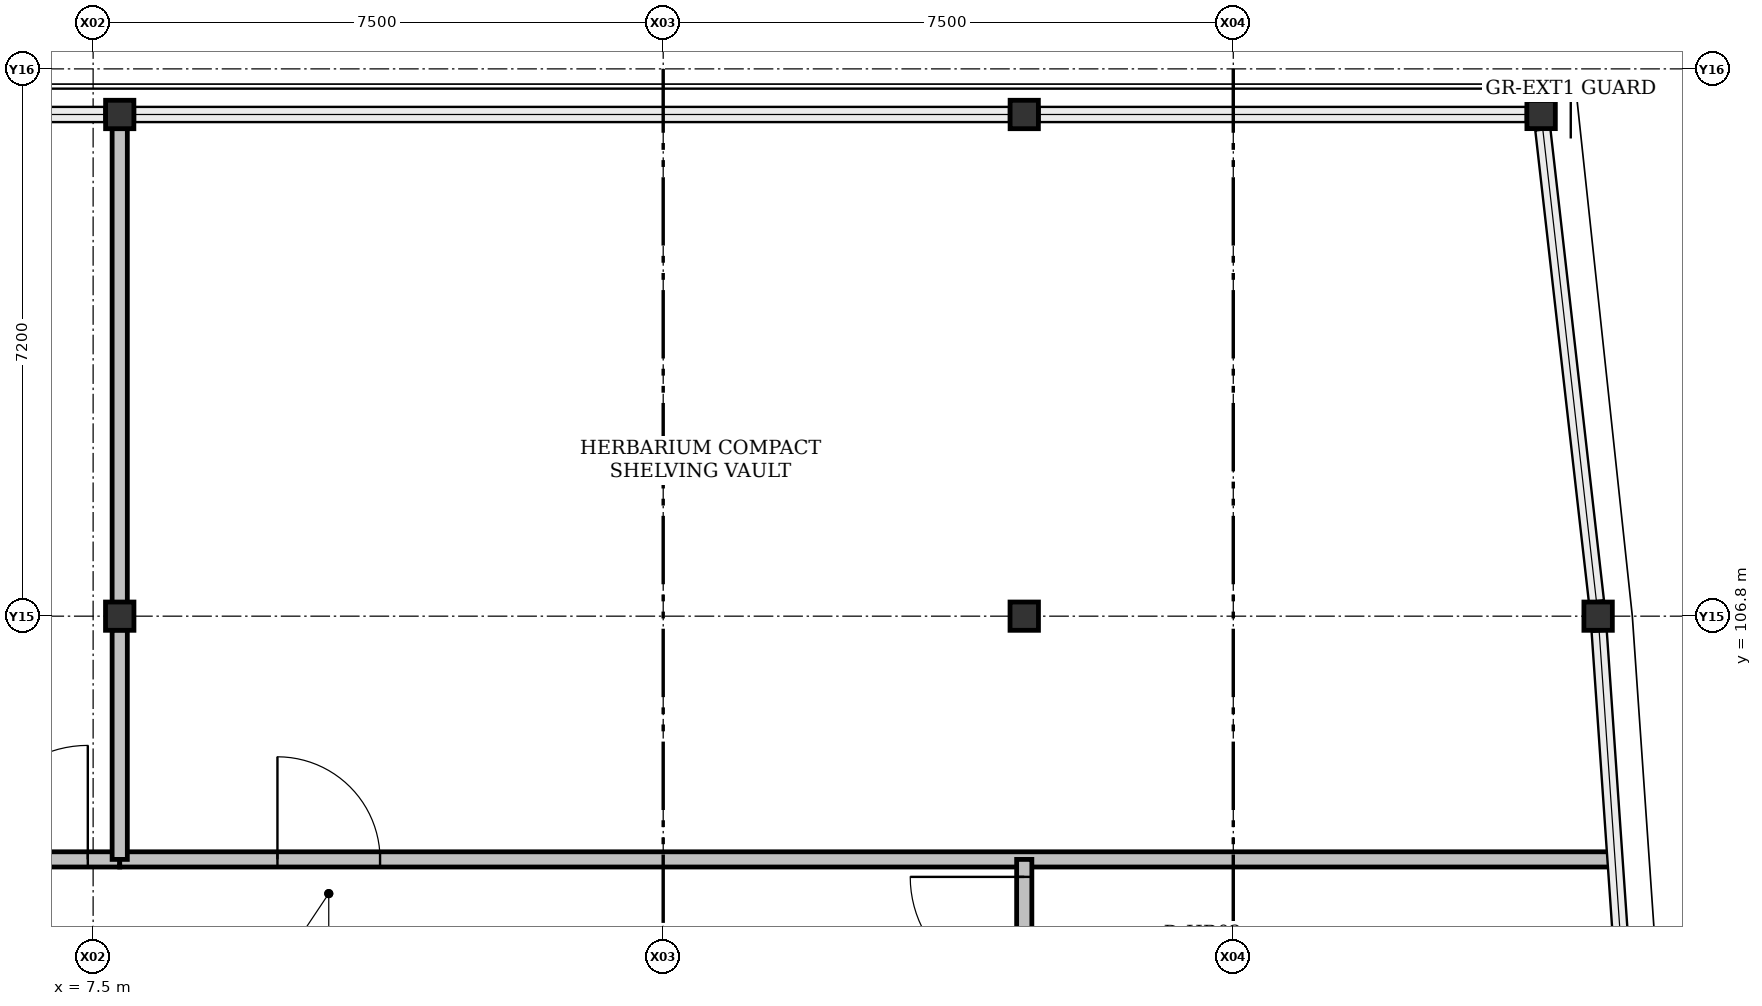
"""IFC4 building model, lengths in metres.
Left out: names, types, materials, properties, quantities, classifications, styles, units other than length and angle.
Written with IfcOpenShell. Run it as: python <this file> out.ifc"""

import sys

from ifc_helpers import new_model, si_unit, direction, frame, frame_2d, origin, origin_2d, place, context, subcontext, project, spatial, rectangle, i_section, extrude, element, fill, save


model = new_model("IFC4")
c1 = context("Model", 3, precision=1e-05, world=origin(), true_north=direction((0.0, 1.0)))
c2 = subcontext(c1, "Body", "Model", "MODEL_VIEW")
j1 = project(units=[si_unit("LENGTHUNIT", "METRE"), si_unit("PLANEANGLEUNIT", "RADIAN")], contexts=[c1])
p1 = place(None, origin())
s1 = spatial("IfcSite", under=j1, at=p1, CompositionType="ELEMENT")
p2 = place(p1, origin())
s2 = spatial("IfcBuilding", under=s1, at=p2, CompositionType="ELEMENT")
p3 = place(p2, frame((0.0, 0.0, 30.9)))
s3 = spatial("IfcBuildingStorey", under=s2, at=p3, CompositionType="ELEMENT", Elevation=30.9)
for number, where, z_axis, x_axis in (
    (1, (7.85, 106.8, 0.0), (0.0, 0.0, 1.0), (1.0, 0.0, 0.0)),
    (2, (19.75, 106.8, 0.0), (0.0, 0.0, 1.0), (1.0, 0.0, 0.0)),
    (3, (27.3, 106.8, 0.0), (0.0, 0.0, 1.0), (1.0, 0.0, 0.0)),
    (4, (7.85, 113.4, 0.0), (0.0, 0.0, 1.0), (0.0, 1.0, 0.0)),
    (5, (19.75, 113.4, 0.0), (0.0, 0.0, 1.0), (0.0, 1.0, 0.0)),
    (6, (26.55, 113.4, 0.0), (0.0, 0.0, 1.0), (1.0, 0.0, 0.0)),
):
    element("IfcColumn", number, at=place(p3, frame(where, z_axis=z_axis, x_axis=x_axis)), inside=s3, PredefinedType="COLUMN", context=c2, shape_type="SweptSolid", body=[
        extrude(i_section(OverallWidth=0.374, OverallDepth=0.372, WebThickness=0.016, FlangeThickness=0.026, FilletRadius=0.015, at=origin_2d()), origin(), (0.0, 0.0, 1.0), 4.2),
    ])
p4 = place(p3, frame((0.65, 103.6, 0.0), z_axis=(0.0, 0.0, 1.0), x_axis=(1.0, 0.0, 0.0)))
e7 = element("IfcWall", 7, at=p4, inside=s3, PredefinedType="SOLIDWALL", context=c2, shape_type="SweptSolid", body=[
    extrude(rectangle(XDim=7.2, YDim=0.2, at=frame_2d((3.6, 0.0))), origin(), (0.0, 0.0, 1.0), 3.512),
])
p5 = place(p4, frame((5.28, 0.0, 0.0)))
e8 = element("IfcOpeningElement", 8, at=p5, cuts=e7, PredefinedType="OPENING", context=c2, shape_type="SweptSolid", body=[
    extrude(rectangle(XDim=1.5, YDim=2.3, at=frame_2d((0.75, 1.15))), frame((0.0, 0.1, 0.0), z_axis=(0.0, -1.0, 0.0), x_axis=(1.0, 0.0, 0.0)), (0.0, 0.0, 1.0), 0.2),
])
p6 = place(p3, frame((7.85, 103.6, 0.0), z_axis=(0.0, 0.0, 1.0), x_axis=(1.0, 0.0, 0.0)))
e9 = element("IfcWall", 9, at=p6, inside=s3, PredefinedType="SOLIDWALL", context=c2, shape_type="SweptSolid", body=[
    extrude(rectangle(XDim=19.69, YDim=0.2, at=frame_2d((9.845, 0.0))), origin(), (0.0, 0.0, 1.0), 3.512),
])
p7 = place(p6, frame((2.075, 0.0, 0.0)))
e10 = element("IfcOpeningElement", 10, at=p7, cuts=e9, PredefinedType="OPENING", context=c2, shape_type="SweptSolid", body=[
    extrude(rectangle(XDim=1.35, YDim=2.25, at=frame_2d((0.675, 1.125))), frame((0.0, 0.1, 0.0), z_axis=(0.0, -1.0, 0.0), x_axis=(1.0, 0.0, 0.0)), (0.0, 0.0, 1.0), 0.2),
])
p8 = place(p3, frame((7.85, 106.619, 0.0), z_axis=(0.0, 0.0, 1.0), x_axis=(0.0, -1.0, 0.0)))
e11 = element("IfcWall", 11, at=p8, inside=s3, PredefinedType="SOLIDWALL", context=c2, shape_type="SweptSolid", body=[
    extrude(rectangle(XDim=3.019, YDim=0.2, at=frame_2d((1.509, 0.0))), origin(), (0.0, 0.0, 1.0), 3.512),
])
p9 = place(p3, frame((7.85, 113.35, 0.0), z_axis=(0.0, 0.0, 1.0), x_axis=(0.0, -1.0, 0.0)))
e12 = element("IfcWall", 12, at=p9, inside=s3, PredefinedType="SOLIDWALL", context=c2, shape_type="SweptSolid", body=[
    extrude(rectangle(XDim=6.369, YDim=0.2, at=frame_2d((3.185, 0.0))), origin(), (0.0, 0.0, 1.0), 3.512),
])
p10 = place(p3, frame((19.75, 99.782, 0.0), z_axis=(0.0, 0.0, 1.0), x_axis=(0.0, 1.0, 0.0)))
e13 = element("IfcWall", 13, at=p10, inside=s3, PredefinedType="SOLIDWALL", context=c2, shape_type="SweptSolid", body=[
    extrude(rectangle(XDim=3.818, YDim=0.2, at=frame_2d((1.909, 0.0))), origin(), (0.0, 0.0, 1.0), 3.512),
])
p11 = place(p10, frame((2.088, 0.0, 0.0)))
e14 = element("IfcOpeningElement", 14, at=p11, cuts=e13, PredefinedType="OPENING", context=c2, shape_type="SweptSolid", body=[
    extrude(rectangle(XDim=1.5, YDim=2.3, at=frame_2d((0.75, 1.15))), frame((0.0, 0.1, 0.0), z_axis=(0.0, -1.0, 0.0), x_axis=(1.0, 0.0, 0.0)), (0.0, 0.0, 1.0), 0.2),
])
p12 = place(p5, origin())
e15 = element("IfcDoor", 15, at=p12, inside=s3, OperationType="SINGLE_SWING_RIGHT", PredefinedType="DOOR", context=c2, shape_type="SweptSolid", body=[
    extrude(rectangle(XDim=1.5, YDim=2.3, at=frame_2d((0.75, 1.15))), frame((0.0, 0.025, 0.0), z_axis=(0.0, -1.0, 0.0), x_axis=(1.0, 0.0, 0.0)), (0.0, 0.0, 1.0), 0.05),
])
fill(e8, e15)
p13 = place(p7, origin())
e16 = element("IfcDoor", 16, at=p13, inside=s3, OperationType="SINGLE_SWING_LEFT", PredefinedType="DOOR", context=c2, shape_type="SweptSolid", body=[
    extrude(rectangle(XDim=1.35, YDim=2.25, at=frame_2d((0.675, 1.125))), frame((0.0, 0.025, 0.0), z_axis=(0.0, -1.0, 0.0), x_axis=(1.0, 0.0, 0.0)), (0.0, 0.0, 1.0), 0.05),
])
fill(e10, e16)
p14 = place(p11, origin())
e17 = element("IfcDoor", 17, at=p14, inside=s3, OperationType="SINGLE_SWING_RIGHT", PredefinedType="DOOR", context=c2, shape_type="SweptSolid", body=[
    extrude(rectangle(XDim=1.5, YDim=2.3, at=frame_2d((0.75, 1.15))), frame((0.0, 0.025, 0.0), z_axis=(0.0, -1.0, 0.0), x_axis=(1.0, 0.0, 0.0)), (0.0, 0.0, 1.0), 0.05),
])
fill(e14, e17)
save(model, sys.argv[1])
